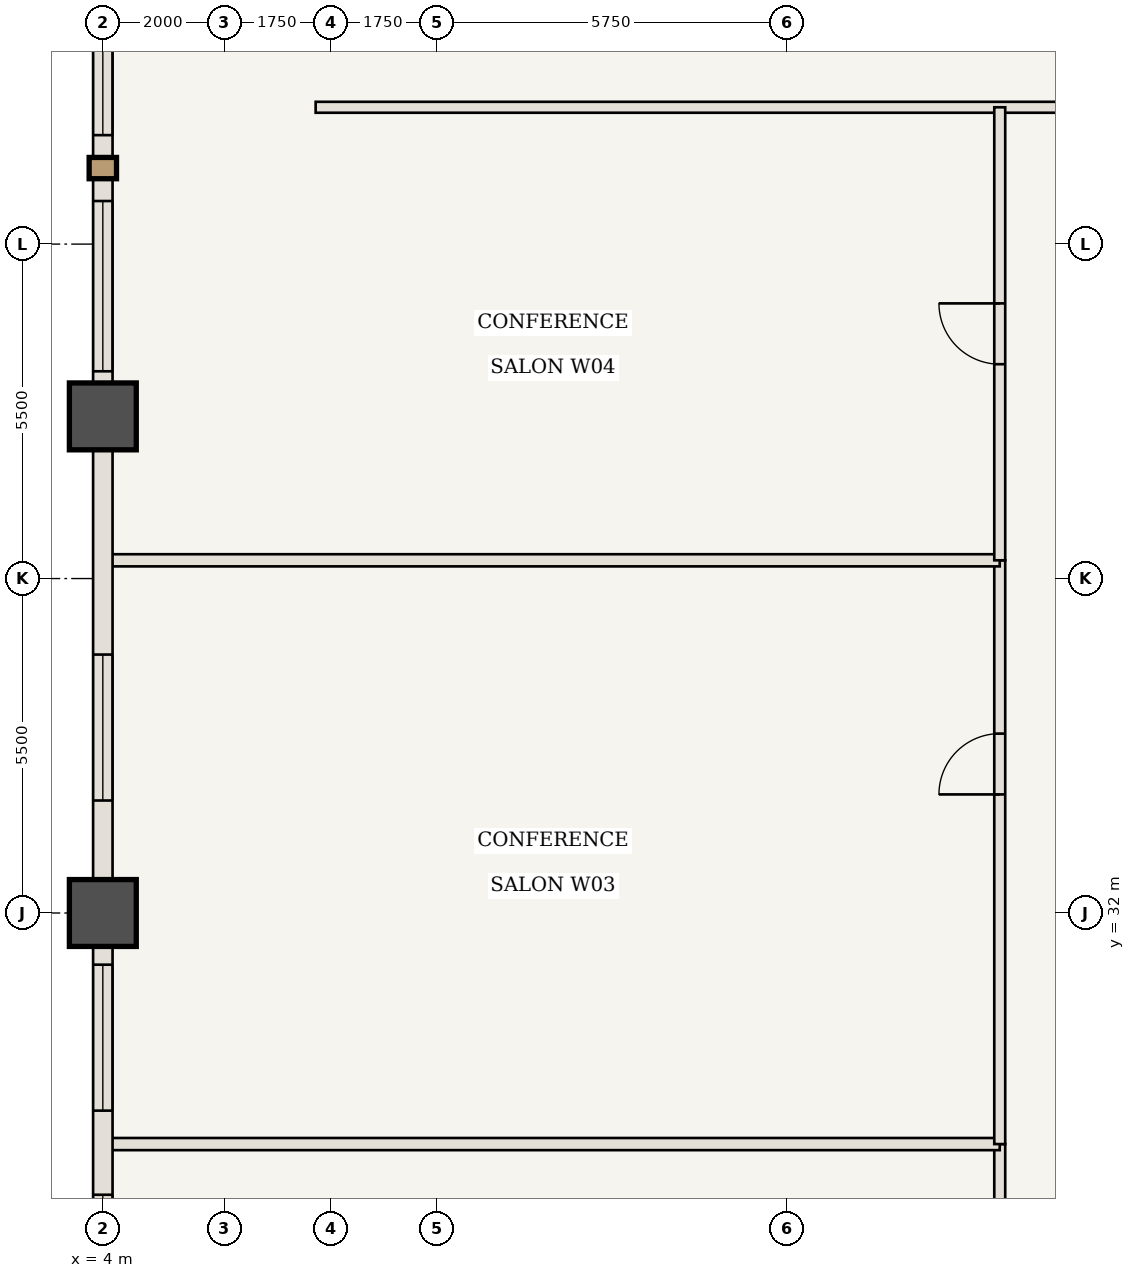
"""IFC4 building model, lengths in metres.
Left out: names, types, materials, properties, quantities, classifications, styles, units other than length and angle.
Written with IfcOpenShell. Run it as: python <this file> out.ifc"""

import sys

from ifc_helpers import new_model, si_unit, direction, frame, frame_2d, origin, origin_2d, place, context, subcontext, project, spatial, rectangle, extrude, element, fill, save


model = new_model("IFC4")
c1 = context("Model", 3, precision=1e-05, world=origin(), true_north=direction((0.0, 1.0)))
c2 = subcontext(c1, "Body", "Model", "MODEL_VIEW")
j1 = project(units=[si_unit("LENGTHUNIT", "METRE"), si_unit("PLANEANGLEUNIT", "RADIAN")], contexts=[c1])
p1 = place(None, origin())
s1 = spatial("IfcSite", under=j1, at=p1, CompositionType="ELEMENT")
p2 = place(p1, origin())
s2 = spatial("IfcBuilding", under=s1, at=p2, CompositionType="ELEMENT")
p3 = place(p2, frame((0.0, 0.0, 85.75)))
s3 = spatial("IfcBuildingStorey", under=s2, at=p3, CompositionType="ELEMENT", Elevation=85.75)
for number, where, z_axis, x_axis in (
    (1, (4.0, 32.0, 0.0), (0.0, 0.0, 1.0), (1.0, 0.0, 0.0)),
    (2, (4.0, 40.167, 0.0), (0.0, 0.0, 1.0), (1.0, 0.0, 0.0)),
):
    element("IfcColumn", number, at=place(p3, frame(where, z_axis=z_axis, x_axis=x_axis)), inside=s3, PredefinedType="COLUMN", context=c2, shape_type="SweptSolid", body=[
        extrude(rectangle(XDim=1.1, YDim=1.1, at=origin_2d()), origin(), (0.0, 0.0, 1.0), 3.5),
    ])
p4 = place(p3, frame((7.5, 45.25, 0.0), z_axis=(0.0, 0.0, 1.0), x_axis=(1.0, 0.0, 0.0)))
e3 = element("IfcWall", 3, at=p4, inside=s3, PredefinedType="STANDARD", context=c2, shape_type="SweptSolid", body=[
    extrude(rectangle(XDim=15.0, YDim=0.18, at=frame_2d((7.5, 0.0))), origin(), (0.0, 0.0, 1.0), 3.32),
])
p5 = place(p4, frame((12.65, 0.0, 0.0)))
e4 = element("IfcOpeningElement", 4, at=p5, cuts=e3, PredefinedType="OPENING", context=c2, shape_type="SweptSolid", body=[
    extrude(rectangle(XDim=1.0, YDim=2.15, at=frame_2d((0.5, 1.075))), frame((0.0, 0.1, 0.0), z_axis=(0.0, -1.0, 0.0), x_axis=(1.0, 0.0, 0.0)), (0.0, 0.0, 1.0), 0.2),
])
p6 = place(p3, frame((18.75, 23.5, 0.0), z_axis=(0.0, 0.0, 1.0), x_axis=(0.0, 1.0, 0.0)))
e5 = element("IfcWall", 5, at=p6, inside=s3, PredefinedType="STANDARD", context=c2, shape_type="SweptSolid", body=[
    extrude(rectangle(XDim=4.7, YDim=0.18, at=frame_2d((2.35, 0.0))), origin(), (0.0, 0.0, 1.0), 3.32),
])
p7 = place(p6, frame((1.85, 0.0, 0.0)))
e6 = element("IfcOpeningElement", 6, at=p7, cuts=e5, PredefinedType="OPENING", context=c2, shape_type="SweptSolid", body=[
    extrude(rectangle(XDim=1.0, YDim=2.15, at=frame_2d((0.5, 1.075))), frame((0.0, 0.1, 0.0), z_axis=(0.0, -1.0, 0.0), x_axis=(1.0, 0.0, 0.0)), (0.0, 0.0, 1.0), 0.2),
])
p8 = place(p3, frame((4.06, 28.2, 0.0), z_axis=(0.0, 0.0, 1.0), x_axis=(1.0, 0.0, 0.0)))
e7 = element("IfcWall", 7, at=p8, inside=s3, PredefinedType="STANDARD", context=c2, shape_type="SweptSolid", body=[
    extrude(rectangle(XDim=14.69, YDim=0.2, at=frame_2d((7.345, 0.0))), origin(), (0.0, 0.0, 1.0), 3.32),
])
p9 = place(p3, frame((18.75, 28.2, 0.0), z_axis=(0.0, 0.0, 1.0), x_axis=(0.0, 1.0, 0.0)))
e8 = element("IfcWall", 8, at=p9, inside=s3, PredefinedType="STANDARD", context=c2, shape_type="SweptSolid", body=[
    extrude(rectangle(XDim=9.6, YDim=0.18, at=frame_2d((4.8, 0.0))), origin(), (0.0, 0.0, 1.0), 3.32),
])
p10 = place(p9, frame((5.75, 0.0, 0.0)))
e9 = element("IfcOpeningElement", 9, at=p10, cuts=e8, PredefinedType="OPENING", context=c2, shape_type="SweptSolid", body=[
    extrude(rectangle(XDim=1.0, YDim=2.15, at=frame_2d((0.5, 1.075))), frame((0.0, 0.1, 0.0), z_axis=(0.0, -1.0, 0.0), x_axis=(1.0, 0.0, 0.0)), (0.0, 0.0, 1.0), 0.2),
])
p11 = place(p3, frame((4.06, 37.8, 0.0), z_axis=(0.0, 0.0, 1.0), x_axis=(1.0, 0.0, 0.0)))
e10 = element("IfcWall", 10, at=p11, inside=s3, PredefinedType="STANDARD", context=c2, shape_type="SweptSolid", body=[
    extrude(rectangle(XDim=14.69, YDim=0.2, at=frame_2d((7.345, 0.0))), origin(), (0.0, 0.0, 1.0), 3.32),
])
p12 = place(p3, frame((18.75, 37.8, 0.0), z_axis=(0.0, 0.0, 1.0), x_axis=(0.0, 1.0, 0.0)))
e11 = element("IfcWall", 11, at=p12, inside=s3, PredefinedType="STANDARD", context=c2, shape_type="SweptSolid", body=[
    extrude(rectangle(XDim=7.45, YDim=0.18, at=frame_2d((3.725, 0.0))), origin(), (0.0, 0.0, 1.0), 3.32),
])
p13 = place(p12, frame((3.225, 0.0, 0.0)))
e12 = element("IfcOpeningElement", 12, at=p13, cuts=e11, PredefinedType="OPENING", context=c2, shape_type="SweptSolid", body=[
    extrude(rectangle(XDim=1.0, YDim=2.15, at=frame_2d((0.5, 1.075))), frame((0.0, 0.1, 0.0), z_axis=(0.0, -1.0, 0.0), x_axis=(1.0, 0.0, 0.0)), (0.0, 0.0, 1.0), 0.2),
])
p14 = place(p3, frame((4.0, 23.833, 0.0), z_axis=(0.0, 0.0, 1.0), x_axis=(0.0, 1.0, 0.0)))
e13 = element("IfcWall", 13, at=p14, inside=s3, PredefinedType="USERDEFINED", context=c2, shape_type="SweptSolid", body=[
    extrude(rectangle(XDim=8.167, YDim=0.32, at=frame_2d((4.083, 0.0))), origin(), (0.0, 0.0, 1.0), 2.52),
])
p15 = place(p14, frame((1.133, 0.0, 0.85)))
e14 = element("IfcOpeningElement", 14, at=p15, cuts=e13, PredefinedType="OPENING", context=c2, shape_type="SweptSolid", body=[
    extrude(rectangle(XDim=2.4, YDim=1.47, at=frame_2d((1.2, 0.735))), frame((0.0, 0.17, 0.0), z_axis=(0.0, -1.0, 0.0), x_axis=(1.0, 0.0, 0.0)), (0.0, 0.0, 1.0), 0.34),
])
p16 = place(p14, frame((4.917, 0.0, 0.85)))
e15 = element("IfcOpeningElement", 15, at=p16, cuts=e13, PredefinedType="OPENING", context=c2, shape_type="SweptSolid", body=[
    extrude(rectangle(XDim=2.4, YDim=1.47, at=frame_2d((1.2, 0.735))), frame((0.0, 0.17, 0.0), z_axis=(0.0, -1.0, 0.0), x_axis=(1.0, 0.0, 0.0)), (0.0, 0.0, 1.0), 0.34),
])
p17 = place(p3, frame((4.0, 32.0, 0.0), z_axis=(0.0, 0.0, 1.0), x_axis=(0.0, 1.0, 0.0)))
e16 = element("IfcWall", 16, at=p17, inside=s3, PredefinedType="USERDEFINED", context=c2, shape_type="SweptSolid", body=[
    extrude(rectangle(XDim=8.167, YDim=0.32, at=frame_2d((4.083, 0.0))), origin(), (0.0, 0.0, 1.0), 2.52),
])
p18 = place(p17, frame((1.85, 0.0, 0.85)))
e17 = element("IfcOpeningElement", 17, at=p18, cuts=e16, PredefinedType="OPENING", context=c2, shape_type="SweptSolid", body=[
    extrude(rectangle(XDim=2.4, YDim=1.47, at=frame_2d((1.2, 0.735))), frame((0.0, 0.17, 0.0), z_axis=(0.0, -1.0, 0.0), x_axis=(1.0, 0.0, 0.0)), (0.0, 0.0, 1.0), 0.34),
])
p19 = place(p3, frame((4.0, 40.167, 0.0), z_axis=(0.0, 0.0, 1.0), x_axis=(0.0, 1.0, 0.0)))
e18 = element("IfcWall", 18, at=p19, inside=s3, PredefinedType="USERDEFINED", context=c2, shape_type="SweptSolid", body=[
    extrude(rectangle(XDim=8.167, YDim=0.32, at=frame_2d((4.083, 0.0))), origin(), (0.0, 0.0, 1.0), 2.52),
])
p20 = place(p19, frame((0.742, 0.0, 0.85)))
e19 = element("IfcOpeningElement", 19, at=p20, cuts=e18, PredefinedType="OPENING", context=c2, shape_type="SweptSolid", body=[
    extrude(rectangle(XDim=2.8, YDim=1.47, at=frame_2d((1.4, 0.735))), frame((0.0, 0.17, 0.0), z_axis=(0.0, -1.0, 0.0), x_axis=(1.0, 0.0, 0.0)), (0.0, 0.0, 1.0), 0.34),
])
p21 = place(p19, frame((4.625, 0.0, 0.85)))
e20 = element("IfcOpeningElement", 20, at=p21, cuts=e18, PredefinedType="OPENING", context=c2, shape_type="SweptSolid", body=[
    extrude(rectangle(XDim=2.8, YDim=1.47, at=frame_2d((1.4, 0.735))), frame((0.0, 0.17, 0.0), z_axis=(0.0, -1.0, 0.0), x_axis=(1.0, 0.0, 0.0)), (0.0, 0.0, 1.0), 0.34),
])
p22 = place(p10, origin())
e21 = element("IfcDoor", 21, at=p22, inside=s3, OperationType="SINGLE_SWING_LEFT", PredefinedType="DOOR", context=c2, shape_type="SweptSolid", body=[
    extrude(rectangle(XDim=1.0, YDim=2.15, at=frame_2d((0.5, 1.075))), frame((0.0, 0.025, 0.0), z_axis=(0.0, -1.0, 0.0), x_axis=(1.0, 0.0, 0.0)), (0.0, 0.0, 1.0), 0.05),
])
fill(e9, e21)
p23 = place(p13, origin())
e22 = element("IfcDoor", 22, at=p23, inside=s3, OperationType="SINGLE_SWING_RIGHT", PredefinedType="DOOR", context=c2, shape_type="SweptSolid", body=[
    extrude(rectangle(XDim=1.0, YDim=2.15, at=frame_2d((0.5, 1.075))), frame((0.0, 0.025, 0.0), z_axis=(0.0, -1.0, 0.0), x_axis=(1.0, 0.0, 0.0)), (0.0, 0.0, 1.0), 0.05),
])
fill(e12, e22)
p24 = place(p15, origin())
e23 = element("IfcWindow", 23, at=p24, inside=s3, PartitioningType="SINGLE_PANEL", PredefinedType="WINDOW", context=c2, shape_type="SweptSolid", body=[
    extrude(rectangle(XDim=2.4, YDim=1.47, at=frame_2d((1.2, 0.735))), frame((0.0, 0.03, 0.0), z_axis=(0.0, -1.0, 0.0), x_axis=(1.0, 0.0, 0.0)), (0.0, 0.0, 1.0), 0.06),
])
fill(e14, e23)
p25 = place(p16, origin())
e24 = element("IfcWindow", 24, at=p25, inside=s3, PartitioningType="SINGLE_PANEL", PredefinedType="WINDOW", context=c2, shape_type="SweptSolid", body=[
    extrude(rectangle(XDim=2.4, YDim=1.47, at=frame_2d((1.2, 0.735))), frame((0.0, 0.03, 0.0), z_axis=(0.0, -1.0, 0.0), x_axis=(1.0, 0.0, 0.0)), (0.0, 0.0, 1.0), 0.06),
])
fill(e15, e24)
p26 = place(p18, origin())
e25 = element("IfcWindow", 25, at=p26, inside=s3, PartitioningType="SINGLE_PANEL", PredefinedType="WINDOW", context=c2, shape_type="SweptSolid", body=[
    extrude(rectangle(XDim=2.4, YDim=1.47, at=frame_2d((1.2, 0.735))), frame((0.0, 0.03, 0.0), z_axis=(0.0, -1.0, 0.0), x_axis=(1.0, 0.0, 0.0)), (0.0, 0.0, 1.0), 0.06),
])
fill(e17, e25)
p27 = place(p20, origin())
e26 = element("IfcWindow", 26, at=p27, inside=s3, PartitioningType="SINGLE_PANEL", PredefinedType="WINDOW", context=c2, shape_type="SweptSolid", body=[
    extrude(rectangle(XDim=2.8, YDim=1.47, at=frame_2d((1.4, 0.735))), frame((0.0, 0.03, 0.0), z_axis=(0.0, -1.0, 0.0), x_axis=(1.0, 0.0, 0.0)), (0.0, 0.0, 1.0), 0.06),
])
fill(e19, e26)
p28 = place(p21, origin())
e27 = element("IfcWindow", 27, at=p28, inside=s3, PartitioningType="SINGLE_PANEL", PredefinedType="WINDOW", context=c2, shape_type="SweptSolid", body=[
    extrude(rectangle(XDim=2.8, YDim=1.47, at=frame_2d((1.4, 0.735))), frame((0.0, 0.03, 0.0), z_axis=(0.0, -1.0, 0.0), x_axis=(1.0, 0.0, 0.0)), (0.0, 0.0, 1.0), 0.06),
])
fill(e20, e27)
save(model, sys.argv[1])
